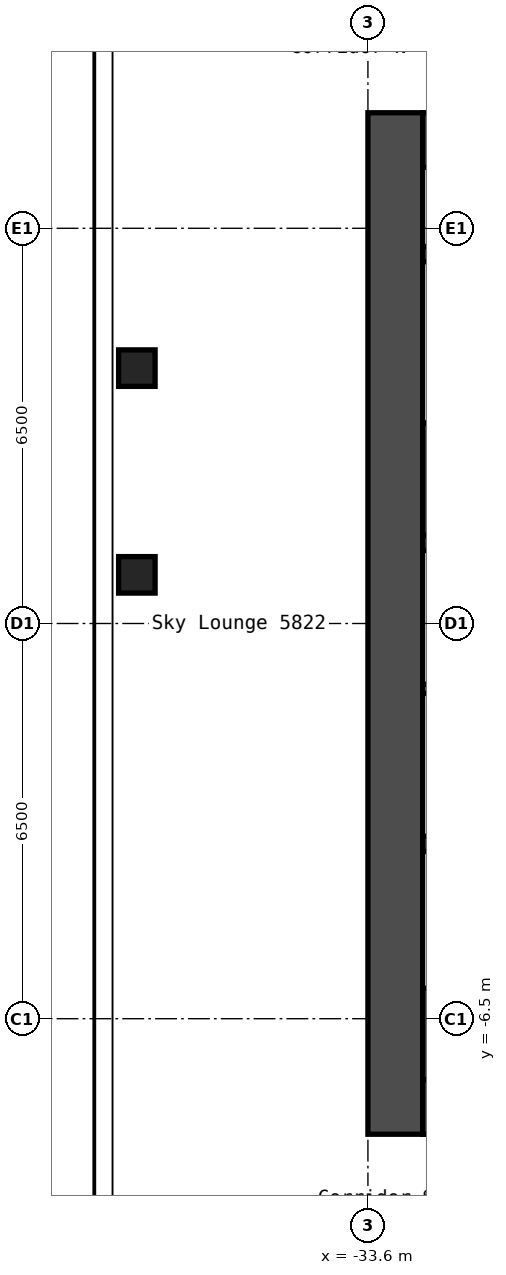
"""IFC4 building model, lengths in metres.
Left out: names, types, materials, properties, quantities, classifications, styles, units other than length and angle.
Written with IfcOpenShell. Run it as: python <this file> out.ifc"""

import sys

from ifc_helpers import new_model, si_unit, direction, frame, frame_2d, origin, origin_2d, place, context, subcontext, project, spatial, rectangle, hollow_rectangle, extrude, element, save


model = new_model("IFC4")
c1 = context("Model", 3, precision=1e-05, world=origin(), true_north=direction((0.0, 1.0)))
c2 = subcontext(c1, "Body", "Model", "MODEL_VIEW")
j1 = project(units=[si_unit("LENGTHUNIT", "METRE"), si_unit("PLANEANGLEUNIT", "RADIAN")], contexts=[c1])
p1 = place(None, origin())
s1 = spatial("IfcSite", under=j1, at=p1, CompositionType="ELEMENT")
p2 = place(p1, origin())
s2 = spatial("IfcBuilding", under=s1, at=p2, CompositionType="ELEMENT")
p3 = place(p2, frame((0.0, 0.0, 205.8)))
s3 = spatial("IfcBuildingStorey", under=s2, at=p3, CompositionType="ELEMENT", Elevation=205.8)
for number, where, z_axis, x_axis in (
    (1, (-37.4, 0.8, 0.0), (0.0, 0.0, 1.0), (1.0, 0.0, 0.0)),
    (2, (-37.4, 4.2, 0.0), (0.0, 0.0, 1.0), (1.0, 0.0, 0.0)),
):
    element("IfcColumn", number, at=place(p3, frame(where, z_axis=z_axis, x_axis=x_axis)), inside=s3, PredefinedType="COLUMN", context=c2, shape_type="SweptSolid", body=[
        extrude(hollow_rectangle(XDim=0.6, YDim=0.6, WallThickness=0.025, InnerFilletRadius=0.038, OuterFilletRadius=0.062, at=origin_2d()), origin(), (0.0, 0.0, 1.0), 2.75),
    ])
p4 = place(p3, frame((-33.15, -8.4, 0.0), z_axis=(0.0, 0.0, 1.0), x_axis=(0.0, 1.0, 0.0)))
e3 = element("IfcWall", 3, at=p4, inside=s3, PredefinedType="SHEAR", context=c2, shape_type="SweptSolid", body=[
    extrude(rectangle(XDim=16.8, YDim=0.9, at=frame_2d((8.4, 0.0))), origin(), (0.0, 0.0, 1.0), 2.75),
])
p5 = place(p3, frame((-32.7, 7.95, 0.0), z_axis=(0.0, 0.0, 1.0), x_axis=(1.0, 0.0, 0.0)))
e4 = element("IfcWall", 4, at=p5, inside=s3, PredefinedType="SHEAR", context=c2, shape_type="SweptSolid", body=[
    extrude(rectangle(XDim=15.0, YDim=0.9, at=frame_2d((7.5, 0.0))), origin(), (0.0, 0.0, 1.0), 2.75),
])
p6 = place(p5, frame((3.4, 0.0, 0.0)))
e5 = element("IfcOpeningElement", 5, at=p6, cuts=e4, PredefinedType="OPENING", context=c2, shape_type="SweptSolid", body=[
    extrude(rectangle(XDim=1.2, YDim=2.1, at=frame_2d((0.6, 1.05))), frame((0.0, 0.46, 0.0), z_axis=(0.0, -1.0, 0.0), x_axis=(1.0, 0.0, 0.0)), (0.0, 0.0, 1.0), 0.92),
])
p7 = place(p5, frame((0.75, 0.0, 0.0)))
e6 = element("IfcOpeningElement", 6, at=p7, cuts=e4, PredefinedType="OPENING", context=c2, shape_type="SweptSolid", body=[
    extrude(rectangle(XDim=0.9, YDim=2.1, at=frame_2d((0.45, 1.05))), frame((0.0, 0.46, 0.0), z_axis=(0.0, -1.0, 0.0), x_axis=(1.0, 0.0, 0.0)), (0.0, 0.0, 1.0), 0.92),
])
p8 = place(p3, frame((-32.7, -7.95, 0.0), z_axis=(0.0, 0.0, 1.0), x_axis=(1.0, 0.0, 0.0)))
e7 = element("IfcWall", 7, at=p8, inside=s3, PredefinedType="SHEAR", context=c2, shape_type="SweptSolid", body=[
    extrude(rectangle(XDim=15.0, YDim=0.9, at=frame_2d((7.5, 0.0))), origin(), (0.0, 0.0, 1.0), 2.75),
])
p9 = place(p8, frame((11.45, 0.0, 0.0)))
e8 = element("IfcOpeningElement", 8, at=p9, cuts=e7, PredefinedType="OPENING", context=c2, shape_type="SweptSolid", body=[
    extrude(rectangle(XDim=1.0, YDim=2.1, at=frame_2d((0.5, 1.05))), frame((0.0, 0.46, 0.0), z_axis=(0.0, -1.0, 0.0), x_axis=(1.0, 0.0, 0.0)), (0.0, 0.0, 1.0), 0.92),
])
p10 = place(p3, frame((-32.7, 1.325, 0.0), z_axis=(0.0, 0.0, 1.0), x_axis=(1.0, 0.0, 0.0)))
e9 = element("IfcWall", 9, at=p10, inside=s3, PredefinedType="SHEAR", context=c2, shape_type="SweptSolid", body=[
    extrude(rectangle(XDim=5.05, YDim=0.25, at=frame_2d((2.525, 0.0))), origin(), (0.0, 0.0, 1.0), 2.75),
])
p11 = place(p10, frame((3.3, 0.0, 0.0)))
e10 = element("IfcOpeningElement", 10, at=p11, cuts=e9, PredefinedType="OPENING", context=c2, shape_type="SweptSolid", body=[
    extrude(rectangle(XDim=1.2, YDim=2.1, at=frame_2d((0.6, 1.05))), frame((0.0, 0.135, 0.0), z_axis=(0.0, -1.0, 0.0), x_axis=(1.0, 0.0, 0.0)), (0.0, 0.0, 1.0), 0.27),
])
p12 = place(p3, frame((-32.7, 2.375, 0.0), z_axis=(0.0, 0.0, 1.0), x_axis=(1.0, 0.0, 0.0)))
e11 = element("IfcWall", 11, at=p12, inside=s3, PredefinedType="SHEAR", context=c2, shape_type="SweptSolid", body=[
    extrude(rectangle(XDim=2.4, YDim=1.85, at=frame_2d((1.2, 0.0))), origin(), (0.0, 0.0, 1.0), 2.75),
])
p13 = place(p3, frame((-32.7, 6.075, 0.0), z_axis=(0.0, 0.0, 1.0), x_axis=(1.0, 0.0, 0.0)))
e12 = element("IfcWall", 12, at=p13, inside=s3, PredefinedType="SHEAR", context=c2, shape_type="SweptSolid", body=[
    extrude(rectangle(XDim=2.4, YDim=0.25, at=frame_2d((1.2, 0.0))), origin(), (0.0, 0.0, 1.0), 2.75),
])
p14 = place(p3, frame((-32.7, -3.625, 0.0), z_axis=(0.0, 0.0, 1.0), x_axis=(1.0, 0.0, 0.0)))
e13 = element("IfcWall", 13, at=p14, inside=s3, PredefinedType="SHEAR", context=c2, shape_type="SweptSolid", body=[
    extrude(rectangle(XDim=4.55, YDim=0.25, at=frame_2d((2.275, 0.0))), origin(), (0.0, 0.0, 1.0), 2.75),
])
p15 = place(p14, frame((2.85, 0.0, 0.0)))
e14 = element("IfcOpeningElement", 14, at=p15, cuts=e13, PredefinedType="OPENING", context=c2, shape_type="SweptSolid", body=[
    extrude(rectangle(XDim=1.1, YDim=2.1, at=frame_2d((0.55, 1.05))), frame((0.0, 0.135, 0.0), z_axis=(0.0, -1.0, 0.0), x_axis=(1.0, 0.0, 0.0)), (0.0, 0.0, 1.0), 0.27),
])
p16 = place(p14, frame((0.6, 0.0, 0.0)))
e15 = element("IfcOpeningElement", 15, at=p16, cuts=e13, PredefinedType="OPENING", context=c2, shape_type="SweptSolid", body=[
    extrude(rectangle(XDim=1.1, YDim=2.1, at=frame_2d((0.55, 1.05))), frame((0.0, 0.135, 0.0), z_axis=(0.0, -1.0, 0.0), x_axis=(1.0, 0.0, 0.0)), (0.0, 0.0, 1.0), 0.27),
])
p17 = place(p3, frame((-32.7, -6.75, 0.0), z_axis=(0.0, 0.0, 1.0), x_axis=(1.0, 0.0, 0.0)))
e16 = element("IfcWall", 16, at=p17, inside=s3, PredefinedType="SHEAR", context=c2, shape_type="SweptSolid", body=[
    extrude(rectangle(XDim=4.55, YDim=1.5, at=frame_2d((2.275, 0.0))), origin(), (0.0, 0.0, 1.0), 2.75),
])
p18 = place(p3, frame((-32.7, -1.075, 0.0), z_axis=(0.0, 0.0, 1.0), x_axis=(1.0, 0.0, 0.0)))
e17 = element("IfcWall", 17, at=p18, inside=s3, PredefinedType="PARTITIONING", context=c2, shape_type="SweptSolid", body=[
    extrude(rectangle(XDim=1.6, YDim=0.15, at=frame_2d((0.8, 0.0))), origin(), (0.0, 0.0, 1.0), 2.75),
])
save(model, sys.argv[1])
